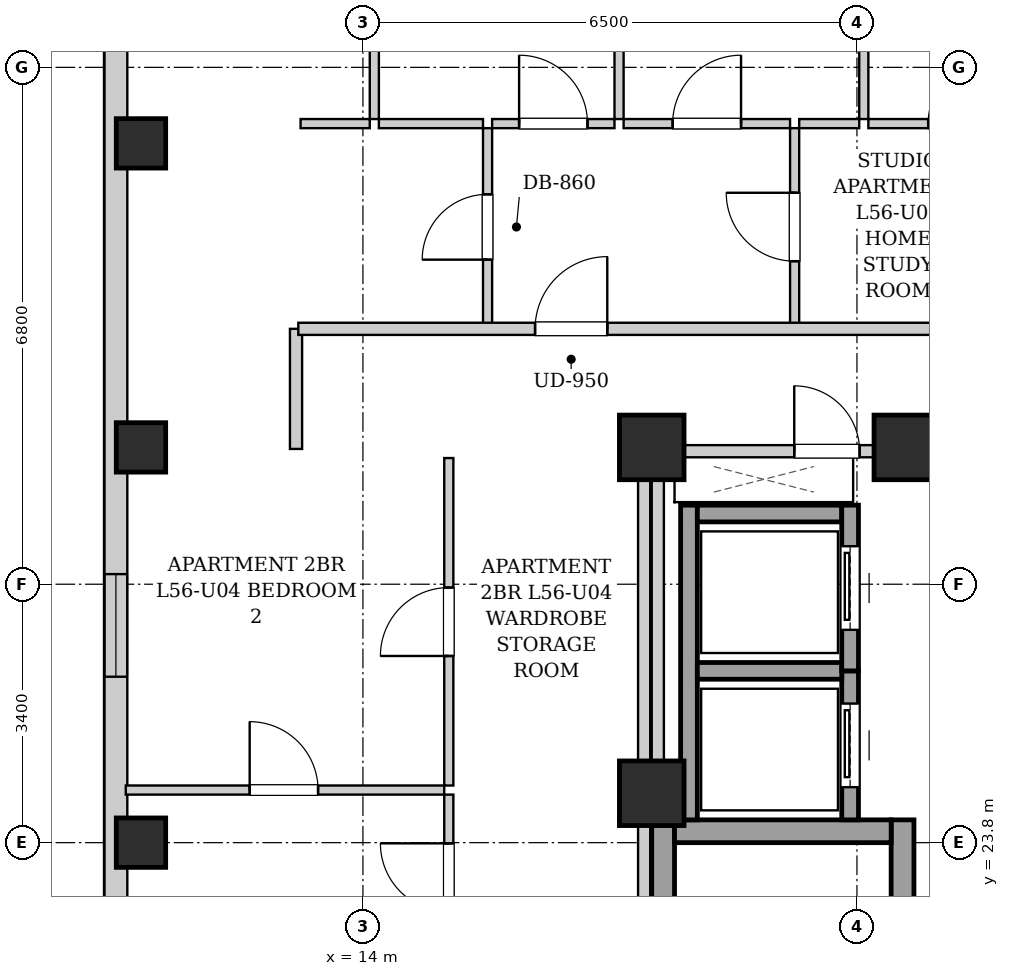
"""IFC4 building model, lengths in metres.
Left out: names, types, materials, properties, quantities, classifications, styles, units other than length and angle.
Written with IfcOpenShell. Run it as: python <this file> out.ifc"""

import sys

from ifc_helpers import new_model, si_unit, direction, frame, frame_2d, origin, origin_2d, place, context, subcontext, project, spatial, rectangle, extrude, element, fill, save


model = new_model("IFC4")
c1 = context("Model", 3, precision=1e-05, world=origin(), true_north=direction((0.0, 1.0)))
c2 = subcontext(c1, "Body", "Model", "MODEL_VIEW")
j1 = project(units=[si_unit("LENGTHUNIT", "METRE"), si_unit("PLANEANGLEUNIT", "RADIAN")], contexts=[c1])
p1 = place(None, origin())
s1 = spatial("IfcSite", under=j1, at=p1, CompositionType="ELEMENT")
p2 = place(p1, origin())
s2 = spatial("IfcBuilding", under=s1, at=p2, CompositionType="ELEMENT")
p3 = place(p2, frame((0.0, 0.0, 194.2)))
s3 = spatial("IfcBuildingStorey", under=s2, at=p3, CompositionType="ELEMENT", Elevation=194.2)
for number, where, z_axis, x_axis in (
    (1, (11.08, 23.8, 0.0), (0.0, 0.0, 1.0), (1.0, 0.0, 0.0)),
    (2, (11.08, 29.0, 0.0), (0.0, 0.0, 1.0), (1.0, 0.0, 0.0)),
    (3, (11.08, 33.0, 0.0), (0.0, 0.0, 1.0), (1.0, 0.0, 0.0)),
):
    element("IfcColumn", number, at=place(p3, frame(where, z_axis=z_axis, x_axis=x_axis)), inside=s3, PredefinedType="COLUMN", context=c2, shape_type="SweptSolid", body=[
        extrude(rectangle(XDim=0.65, YDim=0.65, at=origin_2d()), origin(), (0.0, 0.0, 1.0), 3.3),
    ])
for number, where, z_axis, x_axis in (
    (4, (17.8, 29.0, 0.0), (0.0, 0.0, 1.0), (1.0, 0.0, 0.0)),
    (5, (21.15, 29.0, 0.0), (0.0, 0.0, 1.0), (1.0, 0.0, 0.0)),
    (6, (17.8, 24.45, 0.0), (0.0, 0.0, 1.0), (1.0, 0.0, 0.0)),
):
    element("IfcColumn", number, at=place(p3, frame(where, z_axis=z_axis, x_axis=x_axis)), inside=s3, PredefinedType="COLUMN", context=c2, shape_type="SweptSolid", body=[
        extrude(rectangle(XDim=0.85, YDim=0.85, at=origin_2d()), origin(), (0.0, 0.0, 1.0), 3.3),
    ])
p4 = place(p3, frame((10.75, 6.3, 0.0), z_axis=(0.0, 0.0, 1.0), x_axis=(0.0, 1.0, 0.0)))
e7 = element("IfcWall", 7, at=p4, inside=s3, PredefinedType="SOLIDWALL", context=c2, shape_type="SweptSolid", body=[
    extrude(rectangle(XDim=31.4, YDim=0.3, at=frame_2d((15.7, 0.0))), origin(), (0.0, 0.0, 1.0), 3.04),
])
p5 = place(p4, frame((1.653, 0.0, 0.55)))
e8 = element("IfcOpeningElement", 8, at=p5, cuts=e7, PredefinedType="OPENING", context=c2, shape_type="SweptSolid", body=[
    extrude(rectangle(XDim=1.35, YDim=1.2, at=frame_2d((0.675, 0.6))), frame((0.0, 0.16, 0.0), z_axis=(0.0, -1.0, 0.0), x_axis=(1.0, 0.0, 0.0)), (0.0, 0.0, 1.0), 0.32),
])
p6 = place(p4, frame((28.396, 0.0, 0.55)))
e9 = element("IfcOpeningElement", 9, at=p6, cuts=e7, PredefinedType="OPENING", context=c2, shape_type="SweptSolid", body=[
    extrude(rectangle(XDim=1.35, YDim=1.2, at=frame_2d((0.675, 0.6))), frame((0.0, 0.16, 0.0), z_axis=(0.0, -1.0, 0.0), x_axis=(1.0, 0.0, 0.0)), (0.0, 0.0, 1.0), 0.32),
])
p7 = place(p4, frame((10.367, 0.0, 0.55)))
e10 = element("IfcOpeningElement", 10, at=p7, cuts=e7, PredefinedType="OPENING", context=c2, shape_type="SweptSolid", body=[
    extrude(rectangle(XDim=1.35, YDim=1.2, at=frame_2d((0.675, 0.6))), frame((0.0, 0.16, 0.0), z_axis=(0.0, -1.0, 0.0), x_axis=(1.0, 0.0, 0.0)), (0.0, 0.0, 1.0), 0.32),
])
p8 = place(p4, frame((19.683, 0.0, 0.55)))
e11 = element("IfcOpeningElement", 11, at=p8, cuts=e7, PredefinedType="OPENING", context=c2, shape_type="SweptSolid", body=[
    extrude(rectangle(XDim=1.35, YDim=1.2, at=frame_2d((0.675, 0.6))), frame((0.0, 0.16, 0.0), z_axis=(0.0, -1.0, 0.0), x_axis=(1.0, 0.0, 0.0)), (0.0, 0.0, 1.0), 0.32),
])
for number, where, z_axis, x_axis in (
    (12, (17.95, 15.1, 0.0), (0.0, 0.0, 1.0), (0.0, 1.0, 0.0)),
    (13, (21.1, 15.1, 0.0), (0.0, 0.0, 1.0), (0.0, 1.0, 0.0)),
):
    element("IfcWall", number, at=place(p3, frame(where, z_axis=z_axis, x_axis=x_axis)), inside=s3, PredefinedType="SHEAR", context=c2, shape_type="SweptSolid", body=[
        extrude(rectangle(XDim=9.0, YDim=0.3, at=frame_2d((4.5, 0.0))), origin(), (0.0, 0.0, 1.0), 3.04),
    ])
p9 = place(p3, frame((18.1, 23.95, 0.0), z_axis=(0.0, 0.0, 1.0), x_axis=(1.0, 0.0, 0.0)))
e14 = element("IfcWall", 14, at=p9, inside=s3, PredefinedType="SHEAR", context=c2, shape_type="SweptSolid", body=[
    extrude(rectangle(XDim=2.85, YDim=0.3, at=frame_2d((1.425, 0.0))), origin(), (0.0, 0.0, 1.0), 3.04),
])
p10 = place(p3, frame((18.29, 24.1, 0.0), z_axis=(0.0, 0.0, 1.0), x_axis=(0.0, 1.0, 0.0)))
e15 = element("IfcWall", 15, at=p10, inside=s3, PredefinedType="SHEAR", context=c2, shape_type="SweptSolid", body=[
    extrude(rectangle(XDim=4.14, YDim=0.22, at=frame_2d((2.07, 0.0))), origin(), (0.0, 0.0, 1.0), 3.04),
])
p11 = place(p3, frame((20.41, 24.1, 0.0), z_axis=(0.0, 0.0, 1.0), x_axis=(0.0, 1.0, 0.0)))
e16 = element("IfcWall", 16, at=p11, inside=s3, PredefinedType="SHEAR", context=c2, shape_type="SweptSolid", body=[
    extrude(rectangle(XDim=1.96, YDim=0.22, at=frame_2d((0.98, 0.0))), origin(), (0.0, 0.0, 1.0), 3.04),
])
p12 = place(p11, frame((0.43, 0.0, 0.0)))
e17 = element("IfcOpeningElement", 17, at=p12, cuts=e16, PredefinedType="OPENING", context=c2, shape_type="SweptSolid", body=[
    extrude(rectangle(XDim=1.1, YDim=2.15, at=frame_2d((0.55, 1.075))), frame((0.0, 0.12, 0.0), z_axis=(0.0, -1.0, 0.0), x_axis=(1.0, 0.0, 0.0)), (0.0, 0.0, 1.0), 0.24),
])
for number, where, z_axis, x_axis in (
    (18, (18.4, 26.06, 0.0), (0.0, 0.0, 1.0), (1.0, 0.0, 0.0)),
    (19, (18.4, 28.13, 0.0), (0.0, 0.0, 1.0), (1.0, 0.0, 0.0)),
):
    element("IfcWall", number, at=place(p3, frame(where, z_axis=z_axis, x_axis=x_axis)), inside=s3, PredefinedType="SHEAR", context=c2, shape_type="SweptSolid", body=[
        extrude(rectangle(XDim=1.9, YDim=0.22, at=frame_2d((0.95, 0.0))), origin(), (0.0, 0.0, 1.0), 3.04),
    ])
p13 = place(p3, frame((20.41, 26.06, 0.0), z_axis=(0.0, 0.0, 1.0), x_axis=(0.0, 1.0, 0.0)))
e20 = element("IfcWall", 20, at=p13, inside=s3, PredefinedType="SHEAR", context=c2, shape_type="SweptSolid", body=[
    extrude(rectangle(XDim=2.18, YDim=0.22, at=frame_2d((1.09, 0.0))), origin(), (0.0, 0.0, 1.0), 3.04),
])
p14 = place(p13, frame((0.54, 0.0, 0.0)))
e21 = element("IfcOpeningElement", 21, at=p14, cuts=e20, PredefinedType="OPENING", context=c2, shape_type="SweptSolid", body=[
    extrude(rectangle(XDim=1.1, YDim=2.15, at=frame_2d((0.55, 1.075))), frame((0.0, 0.12, 0.0), z_axis=(0.0, -1.0, 0.0), x_axis=(1.0, 0.0, 0.0)), (0.0, 0.0, 1.0), 0.24),
])
p15 = place(p3, frame((17.88, 24.12, 0.0), z_axis=(0.0, 0.0, 1.0), x_axis=(0.0, 1.0, 0.0)))
e22 = element("IfcWall", 22, at=p15, inside=s3, PredefinedType="PARTITIONING", context=c2, shape_type="SweptSolid", body=[
    extrude(rectangle(XDim=4.76, YDim=0.16, at=frame_2d((2.38, 0.0))), origin(), (0.0, 0.0, 1.0), 3.04),
])
p16 = place(p3, frame((17.96, 28.95, 0.0), z_axis=(0.0, 0.0, 1.0), x_axis=(1.0, 0.0, 0.0)))
e23 = element("IfcWall", 23, at=p16, inside=s3, PredefinedType="PARTITIONING", context=c2, shape_type="SweptSolid", body=[
    extrude(rectangle(XDim=4.29, YDim=0.16, at=frame_2d((2.145, 0.0))), origin(), (0.0, 0.0, 1.0), 2.556),
])
p17 = place(p16, frame((1.715, 0.0, 0.0)))
e24 = element("IfcOpeningElement", 24, at=p17, cuts=e23, PredefinedType="OPENING", context=c2, shape_type="SweptSolid", body=[
    extrude(rectangle(XDim=0.86, YDim=2.05, at=frame_2d((0.43, 1.025))), frame((0.0, 0.09, 0.0), z_axis=(0.0, -1.0, 0.0), x_axis=(1.0, 0.0, 0.0)), (0.0, 0.0, 1.0), 0.18),
])
p18 = place(p3, frame((13.12, 28.98, 0.0), z_axis=(0.0, 0.0, 1.0), x_axis=(0.0, 1.0, 0.0)))
e25 = element("IfcWall", 25, at=p18, inside=s3, PredefinedType="PARTITIONING", context=c2, shape_type="SweptSolid", body=[
    extrude(rectangle(XDim=1.58, YDim=0.16, at=frame_2d((0.79, 0.0))), origin(), (0.0, 0.0, 1.0), 3.04),
])
p19 = place(p3, frame((15.64, 30.6, 0.0), z_axis=(0.0, 0.0, 1.0), x_axis=(0.0, 1.0, 0.0)))
e26 = element("IfcWall", 26, at=p19, inside=s3, PredefinedType="PARTITIONING", context=c2, shape_type="SweptSolid", body=[
    extrude(rectangle(XDim=2.6, YDim=0.12, at=frame_2d((1.3, 0.0))), origin(), (0.0, 0.0, 1.0), 3.04),
])
p20 = place(p19, frame((0.87, 0.0, 0.0)))
e27 = element("IfcOpeningElement", 27, at=p20, cuts=e26, PredefinedType="OPENING", context=c2, shape_type="SweptSolid", body=[
    extrude(rectangle(XDim=0.86, YDim=2.05, at=frame_2d((0.43, 1.025))), frame((0.0, 0.07, 0.0), z_axis=(0.0, -1.0, 0.0), x_axis=(1.0, 0.0, 0.0)), (0.0, 0.0, 1.0), 0.14),
])
p21 = place(p3, frame((13.18, 33.26, 0.0), z_axis=(0.0, 0.0, 1.0), x_axis=(1.0, 0.0, 0.0)))
e28 = element("IfcWall", 28, at=p21, inside=s3, PredefinedType="PARTITIONING", context=c2, shape_type="SweptSolid", body=[
    extrude(rectangle(XDim=0.91, YDim=0.12, at=frame_2d((0.455, 0.0))), origin(), (0.0, 0.0, 1.0), 3.04),
])
p22 = place(p3, frame((14.21, 33.26, 0.0), z_axis=(0.0, 0.0, 1.0), x_axis=(1.0, 0.0, 0.0)))
e29 = element("IfcWall", 29, at=p22, inside=s3, PredefinedType="PARTITIONING", context=c2, shape_type="SweptSolid", body=[
    extrude(rectangle(XDim=1.37, YDim=0.12, at=frame_2d((0.685, 0.0))), origin(), (0.0, 0.0, 1.0), 3.04),
])
p23 = place(p3, frame((19.68, 30.6, 0.0), z_axis=(0.0, 0.0, 1.0), x_axis=(0.0, 1.0, 0.0)))
e30 = element("IfcWall", 30, at=p23, inside=s3, PredefinedType="PARTITIONING", context=c2, shape_type="SweptSolid", body=[
    extrude(rectangle(XDim=2.6, YDim=0.12, at=frame_2d((1.3, 0.0))), origin(), (0.0, 0.0, 1.0), 3.04),
])
p24 = place(p23, frame((0.85, 0.0, 0.0)))
e31 = element("IfcOpeningElement", 31, at=p24, cuts=e30, PredefinedType="OPENING", context=c2, shape_type="SweptSolid", body=[
    extrude(rectangle(XDim=0.9, YDim=2.05, at=frame_2d((0.45, 1.025))), frame((0.0, 0.07, 0.0), z_axis=(0.0, -1.0, 0.0), x_axis=(1.0, 0.0, 0.0)), (0.0, 0.0, 1.0), 0.14),
])
p25 = place(p3, frame((15.7, 33.26, 0.0), z_axis=(0.0, 0.0, 1.0), x_axis=(1.0, 0.0, 0.0)))
e32 = element("IfcWall", 32, at=p25, inside=s3, PredefinedType="PARTITIONING", context=c2, shape_type="SweptSolid", body=[
    extrude(rectangle(XDim=1.61, YDim=0.12, at=frame_2d((0.805, 0.0))), origin(), (0.0, 0.0, 1.0), 3.04),
])
p26 = place(p25, frame((0.355, 0.0, 0.0)))
e33 = element("IfcOpeningElement", 33, at=p26, cuts=e32, PredefinedType="OPENING", context=c2, shape_type="SweptSolid", body=[
    extrude(rectangle(XDim=0.9, YDim=2.05, at=frame_2d((0.45, 1.025))), frame((0.0, 0.07, 0.0), z_axis=(0.0, -1.0, 0.0), x_axis=(1.0, 0.0, 0.0)), (0.0, 0.0, 1.0), 0.14),
])
p27 = place(p3, frame((17.43, 33.26, 0.0), z_axis=(0.0, 0.0, 1.0), x_axis=(1.0, 0.0, 0.0)))
e34 = element("IfcWall", 34, at=p27, inside=s3, PredefinedType="PARTITIONING", context=c2, shape_type="SweptSolid", body=[
    extrude(rectangle(XDim=2.19, YDim=0.12, at=frame_2d((1.095, 0.0))), origin(), (0.0, 0.0, 1.0), 3.04),
])
p28 = place(p27, frame((0.645, 0.0, 0.0)))
e35 = element("IfcOpeningElement", 35, at=p28, cuts=e34, PredefinedType="OPENING", context=c2, shape_type="SweptSolid", body=[
    extrude(rectangle(XDim=0.9, YDim=2.05, at=frame_2d((0.45, 1.025))), frame((0.0, 0.07, 0.0), z_axis=(0.0, -1.0, 0.0), x_axis=(1.0, 0.0, 0.0)), (0.0, 0.0, 1.0), 0.14),
])
p29 = place(p3, frame((19.74, 33.26, 0.0), z_axis=(0.0, 0.0, 1.0), x_axis=(1.0, 0.0, 0.0)))
e36 = element("IfcWall", 36, at=p29, inside=s3, PredefinedType="PARTITIONING", context=c2, shape_type="SweptSolid", body=[
    extrude(rectangle(XDim=0.79, YDim=0.12, at=frame_2d((0.395, 0.0))), origin(), (0.0, 0.0, 1.0), 3.04),
])
p30 = place(p3, frame((20.65, 33.26, 0.0), z_axis=(0.0, 0.0, 1.0), x_axis=(1.0, 0.0, 0.0)))
e37 = element("IfcWall", 37, at=p30, inside=s3, PredefinedType="PARTITIONING", context=c2, shape_type="SweptSolid", body=[
    extrude(rectangle(XDim=2.475, YDim=0.12, at=frame_2d((1.238, 0.0))), origin(), (0.0, 0.0, 1.0), 3.04),
])
p31 = place(p30, frame((0.787, 0.0, 0.0)))
e38 = element("IfcOpeningElement", 38, at=p31, cuts=e37, PredefinedType="OPENING", context=c2, shape_type="SweptSolid", body=[
    extrude(rectangle(XDim=0.9, YDim=2.05, at=frame_2d((0.45, 1.025))), frame((0.0, 0.07, 0.0), z_axis=(0.0, -1.0, 0.0), x_axis=(1.0, 0.0, 0.0)), (0.0, 0.0, 1.0), 0.14),
])
p32 = place(p3, frame((14.15, 33.32, 0.0), z_axis=(0.0, 0.0, 1.0), x_axis=(0.0, 1.0, 0.0)))
e39 = element("IfcWall", 39, at=p32, inside=s3, PredefinedType="PARTITIONING", context=c2, shape_type="SweptSolid", body=[
    extrude(rectangle(XDim=6.6, YDim=0.12, at=frame_2d((3.3, 0.0))), origin(), (0.0, 0.0, 1.0), 3.04),
])
p33 = place(p32, frame((2.835, 0.0, 0.0)))
e40 = element("IfcOpeningElement", 40, at=p33, cuts=e39, PredefinedType="OPENING", context=c2, shape_type="SweptSolid", body=[
    extrude(rectangle(XDim=0.9, YDim=2.05, at=frame_2d((0.45, 1.025))), frame((0.0, 0.07, 0.0), z_axis=(0.0, -1.0, 0.0), x_axis=(1.0, 0.0, 0.0)), (0.0, 0.0, 1.0), 0.14),
])
p34 = place(p3, frame((17.37, 33.32, 0.0), z_axis=(0.0, 0.0, 1.0), x_axis=(0.0, 1.0, 0.0)))
e41 = element("IfcWall", 41, at=p34, inside=s3, PredefinedType="PARTITIONING", context=c2, shape_type="SweptSolid", body=[
    extrude(rectangle(XDim=6.6, YDim=0.12, at=frame_2d((3.3, 0.0))), origin(), (0.0, 0.0, 1.0), 3.04),
])
p35 = place(p34, frame((2.835, 0.0, 0.0)))
e42 = element("IfcOpeningElement", 42, at=p35, cuts=e41, PredefinedType="OPENING", context=c2, shape_type="SweptSolid", body=[
    extrude(rectangle(XDim=0.9, YDim=2.05, at=frame_2d((0.45, 1.025))), frame((0.0, 0.07, 0.0), z_axis=(0.0, -1.0, 0.0), x_axis=(1.0, 0.0, 0.0)), (0.0, 0.0, 1.0), 0.14),
])
p36 = place(p3, frame((20.59, 33.32, 0.0), z_axis=(0.0, 0.0, 1.0), x_axis=(0.0, 1.0, 0.0)))
e43 = element("IfcWall", 43, at=p36, inside=s3, PredefinedType="PARTITIONING", context=c2, shape_type="SweptSolid", body=[
    extrude(rectangle(XDim=6.6, YDim=0.12, at=frame_2d((3.3, 0.0))), origin(), (0.0, 0.0, 1.0), 3.04),
])
p37 = place(p36, frame((2.835, 0.0, 0.0)))
e44 = element("IfcOpeningElement", 44, at=p37, cuts=e43, PredefinedType="OPENING", context=c2, shape_type="SweptSolid", body=[
    extrude(rectangle(XDim=0.9, YDim=2.05, at=frame_2d((0.45, 1.025))), frame((0.0, 0.07, 0.0), z_axis=(0.0, -1.0, 0.0), x_axis=(1.0, 0.0, 0.0)), (0.0, 0.0, 1.0), 0.14),
])
p38 = place(p3, frame((15.13, 22.25, 0.0), z_axis=(0.0, 0.0, 1.0), x_axis=(0.0, 1.0, 0.0)))
e45 = element("IfcWall", 45, at=p38, inside=s3, PredefinedType="PARTITIONING", context=c2, shape_type="SweptSolid", body=[
    extrude(rectangle(XDim=2.182, YDim=0.12, at=frame_2d((1.091, 0.0))), origin(), (0.0, 0.0, 1.0), 3.04),
])
p39 = place(p38, frame((0.641, 0.0, 0.0)))
e46 = element("IfcOpeningElement", 46, at=p39, cuts=e45, PredefinedType="OPENING", context=c2, shape_type="SweptSolid", body=[
    extrude(rectangle(XDim=0.9, YDim=2.05, at=frame_2d((0.45, 1.025))), frame((0.0, 0.07, 0.0), z_axis=(0.0, -1.0, 0.0), x_axis=(1.0, 0.0, 0.0)), (0.0, 0.0, 1.0), 0.14),
])
p40 = place(p3, frame((15.13, 24.552, 0.0), z_axis=(0.0, 0.0, 1.0), x_axis=(0.0, 1.0, 0.0)))
e47 = element("IfcWall", 47, at=p40, inside=s3, PredefinedType="PARTITIONING", context=c2, shape_type="SweptSolid", body=[
    extrude(rectangle(XDim=4.308, YDim=0.12, at=frame_2d((2.154, 0.0))), origin(), (0.0, 0.0, 1.0), 3.04),
])
p41 = place(p40, frame((1.704, 0.0, 0.0)))
e48 = element("IfcOpeningElement", 48, at=p41, cuts=e47, PredefinedType="OPENING", context=c2, shape_type="SweptSolid", body=[
    extrude(rectangle(XDim=0.9, YDim=2.05, at=frame_2d((0.45, 1.025))), frame((0.0, 0.07, 0.0), z_axis=(0.0, -1.0, 0.0), x_axis=(1.0, 0.0, 0.0)), (0.0, 0.0, 1.0), 0.14),
])
p42 = place(p3, frame((10.88, 24.492, 0.0), z_axis=(0.0, 0.0, 1.0), x_axis=(1.0, 0.0, 0.0)))
e49 = element("IfcWall", 49, at=p42, inside=s3, PredefinedType="PARTITIONING", context=c2, shape_type="SweptSolid", body=[
    extrude(rectangle(XDim=4.19, YDim=0.12, at=frame_2d((2.095, 0.0))), origin(), (0.0, 0.0, 1.0), 2.722),
])
p43 = place(p42, frame((1.63, 0.0, 0.0)))
e50 = element("IfcOpeningElement", 50, at=p43, cuts=e49, PredefinedType="OPENING", context=c2, shape_type="SweptSolid", body=[
    extrude(rectangle(XDim=0.9, YDim=2.05, at=frame_2d((0.45, 1.025))), frame((0.0, 0.07, 0.0), z_axis=(0.0, -1.0, 0.0), x_axis=(1.0, 0.0, 0.0)), (0.0, 0.0, 1.0), 0.14),
])
p44 = place(p3, frame((13.15, 30.56, 0.0), z_axis=(0.0, 0.0, 1.0), x_axis=(1.0, 0.0, 0.0)))
e51 = element("IfcWall", 51, at=p44, inside=s3, PredefinedType="PARTITIONING", context=c2, shape_type="SweptSolid", body=[
    extrude(rectangle(XDim=24.6, YDim=0.16, at=frame_2d((12.3, 0.0))), origin(), (0.0, 0.0, 1.0), 3.04),
])
p45 = place(p44, frame((3.115, 0.0, 0.0)))
e52 = element("IfcOpeningElement", 52, at=p45, cuts=e51, PredefinedType="OPENING", context=c2, shape_type="SweptSolid", body=[
    extrude(rectangle(XDim=0.95, YDim=2.1, at=frame_2d((0.475, 1.05))), frame((0.0, 0.09, 0.0), z_axis=(0.0, -1.0, 0.0), x_axis=(1.0, 0.0, 0.0)), (0.0, 0.0, 1.0), 0.18),
])
p46 = place(p3, frame((17.7, 15.02, 0.0), z_axis=(0.0, 0.0, 1.0), x_axis=(0.0, 1.0, 0.0)))
e53 = element("IfcWall", 53, at=p46, inside=s3, PredefinedType="PARTITIONING", context=c2, shape_type="SweptSolid", body=[
    extrude(rectangle(XDim=13.98, YDim=0.16, at=frame_2d((6.99, 0.0))), origin(), (0.0, 0.0, 1.0), 3.04),
])
p47 = place(p12, origin())
e54 = element("IfcDoor", 54, at=p47, inside=s3, OperationType="SLIDING_TO_LEFT", PredefinedType="DOOR", context=c2, shape_type="SweptSolid", body=[
    extrude(rectangle(XDim=1.1, YDim=2.15, at=frame_2d((0.55, 1.075))), frame((0.0, 0.025, 0.0), z_axis=(0.0, -1.0, 0.0), x_axis=(1.0, 0.0, 0.0)), (0.0, 0.0, 1.0), 0.05),
])
fill(e17, e54)
p48 = place(p14, origin())
e55 = element("IfcDoor", 55, at=p48, inside=s3, OperationType="SLIDING_TO_LEFT", PredefinedType="DOOR", context=c2, shape_type="SweptSolid", body=[
    extrude(rectangle(XDim=1.1, YDim=2.15, at=frame_2d((0.55, 1.075))), frame((0.0, 0.025, 0.0), z_axis=(0.0, -1.0, 0.0), x_axis=(1.0, 0.0, 0.0)), (0.0, 0.0, 1.0), 0.05),
])
fill(e21, e55)
p49 = place(p17, origin())
e56 = element("IfcDoor", 56, at=p49, inside=s3, OperationType="SINGLE_SWING_LEFT", PredefinedType="DOOR", context=c2, shape_type="SweptSolid", body=[
    extrude(rectangle(XDim=0.86, YDim=2.05, at=frame_2d((0.43, 1.025))), frame((0.0, 0.025, 0.0), z_axis=(0.0, -1.0, 0.0), x_axis=(1.0, 0.0, 0.0)), (0.0, 0.0, 1.0), 0.05),
])
fill(e24, e56)
p50 = place(p20, origin())
e57 = element("IfcDoor", 57, at=p50, inside=s3, OperationType="SINGLE_SWING_LEFT", PredefinedType="DOOR", context=c2, shape_type="SweptSolid", body=[
    extrude(rectangle(XDim=0.86, YDim=2.05, at=frame_2d((0.43, 1.025))), frame((0.0, 0.025, 0.0), z_axis=(0.0, -1.0, 0.0), x_axis=(1.0, 0.0, 0.0)), (0.0, 0.0, 1.0), 0.05),
])
fill(e27, e57)
p51 = place(p24, origin())
e58 = element("IfcDoor", 58, at=p51, inside=s3, OperationType="SINGLE_SWING_RIGHT", PredefinedType="DOOR", context=c2, shape_type="SweptSolid", body=[
    extrude(rectangle(XDim=0.9, YDim=2.05, at=frame_2d((0.45, 1.025))), frame((0.0, 0.025, 0.0), z_axis=(0.0, -1.0, 0.0), x_axis=(1.0, 0.0, 0.0)), (0.0, 0.0, 1.0), 0.05),
])
fill(e31, e58)
p52 = place(p26, origin())
e59 = element("IfcDoor", 59, at=p52, inside=s3, OperationType="SINGLE_SWING_LEFT", PredefinedType="DOOR", context=c2, shape_type="SweptSolid", body=[
    extrude(rectangle(XDim=0.9, YDim=2.05, at=frame_2d((0.45, 1.025))), frame((0.0, 0.025, 0.0), z_axis=(0.0, -1.0, 0.0), x_axis=(1.0, 0.0, 0.0)), (0.0, 0.0, 1.0), 0.05),
])
fill(e33, e59)
p53 = place(p28, origin())
e60 = element("IfcDoor", 60, at=p53, inside=s3, OperationType="SINGLE_SWING_RIGHT", PredefinedType="DOOR", context=c2, shape_type="SweptSolid", body=[
    extrude(rectangle(XDim=0.9, YDim=2.05, at=frame_2d((0.45, 1.025))), frame((0.0, 0.025, 0.0), z_axis=(0.0, -1.0, 0.0), x_axis=(1.0, 0.0, 0.0)), (0.0, 0.0, 1.0), 0.05),
])
fill(e35, e60)
p54 = place(p31, origin())
e61 = element("IfcDoor", 61, at=p54, inside=s3, OperationType="SINGLE_SWING_RIGHT", PredefinedType="DOOR", context=c2, shape_type="SweptSolid", body=[
    extrude(rectangle(XDim=0.9, YDim=2.05, at=frame_2d((0.45, 1.025))), frame((0.0, 0.025, 0.0), z_axis=(0.0, -1.0, 0.0), x_axis=(1.0, 0.0, 0.0)), (0.0, 0.0, 1.0), 0.05),
])
fill(e38, e61)
p55 = place(p39, origin())
e62 = element("IfcDoor", 62, at=p55, inside=s3, OperationType="SINGLE_SWING_RIGHT", PredefinedType="DOOR", context=c2, shape_type="SweptSolid", body=[
    extrude(rectangle(XDim=0.9, YDim=2.05, at=frame_2d((0.45, 1.025))), frame((0.0, 0.025, 0.0), z_axis=(0.0, -1.0, 0.0), x_axis=(1.0, 0.0, 0.0)), (0.0, 0.0, 1.0), 0.05),
])
fill(e46, e62)
p56 = place(p41, origin())
e63 = element("IfcDoor", 63, at=p56, inside=s3, OperationType="SINGLE_SWING_LEFT", PredefinedType="DOOR", context=c2, shape_type="SweptSolid", body=[
    extrude(rectangle(XDim=0.9, YDim=2.05, at=frame_2d((0.45, 1.025))), frame((0.0, 0.025, 0.0), z_axis=(0.0, -1.0, 0.0), x_axis=(1.0, 0.0, 0.0)), (0.0, 0.0, 1.0), 0.05),
])
fill(e48, e63)
p57 = place(p43, origin())
e64 = element("IfcDoor", 64, at=p57, inside=s3, OperationType="SINGLE_SWING_LEFT", PredefinedType="DOOR", context=c2, shape_type="SweptSolid", body=[
    extrude(rectangle(XDim=0.9, YDim=2.05, at=frame_2d((0.45, 1.025))), frame((0.0, 0.025, 0.0), z_axis=(0.0, -1.0, 0.0), x_axis=(1.0, 0.0, 0.0)), (0.0, 0.0, 1.0), 0.05),
])
fill(e50, e64)
p58 = place(p45, origin())
e65 = element("IfcDoor", 65, at=p58, inside=s3, OperationType="SINGLE_SWING_RIGHT", PredefinedType="DOOR", context=c2, shape_type="SweptSolid", body=[
    extrude(rectangle(XDim=0.95, YDim=2.1, at=frame_2d((0.475, 1.05))), frame((0.0, 0.025, 0.0), z_axis=(0.0, -1.0, 0.0), x_axis=(1.0, 0.0, 0.0)), (0.0, 0.0, 1.0), 0.05),
])
fill(e52, e65)
p59 = place(p8, origin())
e66 = element("IfcWindow", 66, at=p59, inside=s3, PartitioningType="SINGLE_PANEL", PredefinedType="WINDOW", context=c2, shape_type="SweptSolid", body=[
    extrude(rectangle(XDim=1.35, YDim=1.2, at=frame_2d((0.675, 0.6))), frame((0.0, 0.03, 0.0), z_axis=(0.0, -1.0, 0.0), x_axis=(1.0, 0.0, 0.0)), (0.0, 0.0, 1.0), 0.06),
])
fill(e11, e66)
save(model, sys.argv[1])
